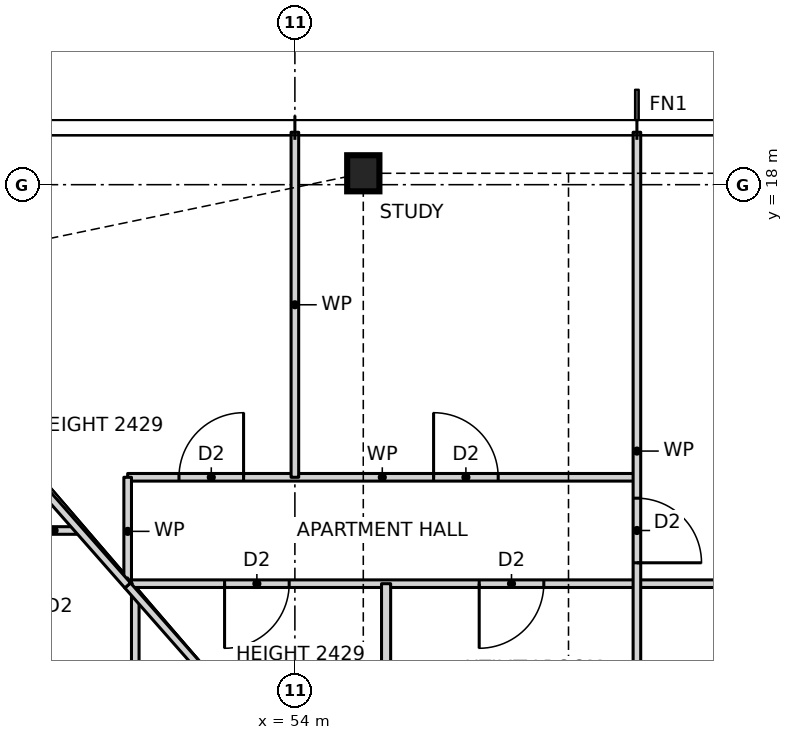
"""IFC4 building model, lengths in metres.
Left out: names, types, materials, properties, quantities, classifications, styles, units other than length and angle.
Written with IfcOpenShell. Run it as: python <this file> out.ifc"""

import sys

from ifc_helpers import new_model, si_unit, direction, frame, frame_2d, origin, origin_2d, place, context, subcontext, project, spatial, rectangle, i_section, extrude, element, fill, save


model = new_model("IFC4")
c1 = context("Model", 3, precision=1e-05, world=origin(), true_north=direction((0.0, 1.0)))
c2 = subcontext(c1, "Body", "Model", "MODEL_VIEW")
j1 = project(units=[si_unit("LENGTHUNIT", "METRE"), si_unit("PLANEANGLEUNIT", "RADIAN")], contexts=[c1])
p1 = place(None, origin())
s1 = spatial("IfcSite", under=j1, at=p1, CompositionType="ELEMENT")
p2 = place(p1, origin())
s2 = spatial("IfcBuilding", under=s1, at=p2, CompositionType="ELEMENT")
p3 = place(p2, frame((0.0, 0.0, 15.0)))
s3 = spatial("IfcBuildingStorey", under=s2, at=p3, CompositionType="ELEMENT", Elevation=15.0)
p4 = place(p3, frame((54.9, 18.15, 0.0), z_axis=(0.0, 0.0, 1.0), x_axis=(1.0, 0.0, 0.0)))
e1 = element("IfcColumn", 1, at=p4, inside=s3, PredefinedType="COLUMN", context=c2, shape_type="SweptSolid", body=[
    extrude(i_section(OverallWidth=0.424, OverallDepth=0.475, WebThickness=0.048, FlangeThickness=0.077, at=origin_2d()), origin(), (0.0, 0.0, 1.0), 3.5),
])
p5 = place(p3, frame((51.8, 12.75, 0.0), z_axis=(0.0, 0.0, 1.0), x_axis=(1.0, 0.0, 0.0)))
e2 = element("IfcWall", 2, at=p5, inside=s3, PredefinedType="PARTITIONING", context=c2, shape_type="SweptSolid", body=[
    extrude(rectangle(XDim=22.4, YDim=0.1, at=frame_2d((11.2, 0.0))), origin(), (0.0, 0.0, 1.0), 3.27),
])
p6 = place(p5, frame((13.475, 0.0, 0.0)))
e3 = element("IfcOpeningElement", 3, at=p6, cuts=e2, PredefinedType="OPENING", context=c2, shape_type="SweptSolid", body=[
    extrude(rectangle(XDim=0.85, YDim=2.1, at=frame_2d((0.425, 1.05))), frame((0.0, 0.06, 0.0), z_axis=(0.0, -1.0, 0.0), x_axis=(1.0, 0.0, 0.0)), (0.0, 0.0, 1.0), 0.12),
])
p7 = place(p5, frame((10.275, 0.0, 0.0)))
e4 = element("IfcOpeningElement", 4, at=p7, cuts=e2, PredefinedType="OPENING", context=c2, shape_type="SweptSolid", body=[
    extrude(rectangle(XDim=0.85, YDim=2.1, at=frame_2d((0.425, 1.05))), frame((0.0, 0.06, 0.0), z_axis=(0.0, -1.0, 0.0), x_axis=(1.0, 0.0, 0.0)), (0.0, 0.0, 1.0), 0.12),
])
p8 = place(p5, frame((16.925, 0.0, 0.0)))
e5 = element("IfcOpeningElement", 5, at=p8, cuts=e2, PredefinedType="OPENING", context=c2, shape_type="SweptSolid", body=[
    extrude(rectangle(XDim=0.85, YDim=2.1, at=frame_2d((0.425, 1.05))), frame((0.0, 0.06, 0.0), z_axis=(0.0, -1.0, 0.0), x_axis=(1.0, 0.0, 0.0)), (0.0, 0.0, 1.0), 0.12),
])
p9 = place(p5, frame((20.275, 0.0, 0.0)))
e6 = element("IfcOpeningElement", 6, at=p9, cuts=e2, PredefinedType="OPENING", context=c2, shape_type="SweptSolid", body=[
    extrude(rectangle(XDim=0.85, YDim=2.1, at=frame_2d((0.425, 1.05))), frame((0.0, 0.06, 0.0), z_axis=(0.0, -1.0, 0.0), x_axis=(1.0, 0.0, 0.0)), (0.0, 0.0, 1.0), 0.12),
])
p10 = place(p5, frame((4.625, 0.0, 0.0)))
e7 = element("IfcOpeningElement", 7, at=p10, cuts=e2, PredefinedType="OPENING", context=c2, shape_type="SweptSolid", body=[
    extrude(rectangle(XDim=0.85, YDim=2.1, at=frame_2d((0.425, 1.05))), frame((0.0, 0.06, 0.0), z_axis=(0.0, -1.0, 0.0), x_axis=(1.0, 0.0, 0.0)), (0.0, 0.0, 1.0), 0.12),
])
p11 = place(p5, frame((1.275, 0.0, 0.0)))
e8 = element("IfcOpeningElement", 8, at=p11, cuts=e2, PredefinedType="OPENING", context=c2, shape_type="SweptSolid", body=[
    extrude(rectangle(XDim=0.85, YDim=2.1, at=frame_2d((0.425, 1.05))), frame((0.0, 0.06, 0.0), z_axis=(0.0, -1.0, 0.0), x_axis=(1.0, 0.0, 0.0)), (0.0, 0.0, 1.0), 0.12),
])
p12 = place(p3, frame((50.5, 13.45, 0.0), z_axis=(0.0, 0.0, 1.0), x_axis=(1.0, 0.0, 0.0)))
e9 = element("IfcWall", 9, at=p12, inside=s3, PredefinedType="PARTITIONING", context=c2, shape_type="SweptSolid", body=[
    extrude(rectangle(XDim=0.664, YDim=0.1, at=frame_2d((0.332, 0.0))), origin(), (0.0, 0.0, 1.0), 3.27),
])
p13 = place(p3, frame((51.8, 14.15, 0.0), z_axis=(0.0, 0.0, 1.0), x_axis=(1.0, 0.0, 0.0)))
e10 = element("IfcWall", 10, at=p13, inside=s3, PredefinedType="PARTITIONING", context=c2, shape_type="SweptSolid", body=[
    extrude(rectangle(XDim=6.7, YDim=0.1, at=frame_2d((3.35, 0.0))), origin(), (0.0, 0.0, 1.0), 3.27),
])
p14 = place(p13, frame((4.025, 0.0, 0.0)))
e11 = element("IfcOpeningElement", 11, at=p14, cuts=e10, PredefinedType="OPENING", context=c2, shape_type="SweptSolid", body=[
    extrude(rectangle(XDim=0.85, YDim=2.1, at=frame_2d((0.425, 1.05))), frame((0.0, 0.06, 0.0), z_axis=(0.0, -1.0, 0.0), x_axis=(1.0, 0.0, 0.0)), (0.0, 0.0, 1.0), 0.12),
])
p15 = place(p13, frame((0.675, 0.0, 0.0)))
e12 = element("IfcOpeningElement", 12, at=p15, cuts=e10, PredefinedType="OPENING", context=c2, shape_type="SweptSolid", body=[
    extrude(rectangle(XDim=0.85, YDim=2.1, at=frame_2d((0.425, 1.05))), frame((0.0, 0.06, 0.0), z_axis=(0.0, -1.0, 0.0), x_axis=(1.0, 0.0, 0.0)), (0.0, 0.0, 1.0), 0.12),
])
p16 = place(p3, frame((58.5, 10.3, 0.0), z_axis=(0.0, 0.0, 1.0), x_axis=(0.0, 1.0, 0.0)))
e13 = element("IfcWall", 13, at=p16, inside=s3, PredefinedType="PARTITIONING", context=c2, shape_type="SweptSolid", body=[
    extrude(rectangle(XDim=8.39, YDim=0.1, at=frame_2d((4.195, 0.0))), origin(), (0.0, 0.0, 1.0), 3.27),
])
p17 = place(p16, frame((2.725, 0.0, 0.0)))
e14 = element("IfcOpeningElement", 14, at=p17, cuts=e13, PredefinedType="OPENING", context=c2, shape_type="SweptSolid", body=[
    extrude(rectangle(XDim=0.85, YDim=2.1, at=frame_2d((0.425, 1.05))), frame((0.0, 0.06, 0.0), z_axis=(0.0, -1.0, 0.0), x_axis=(1.0, 0.0, 0.0)), (0.0, 0.0, 1.0), 0.12),
])
p18 = place(p3, frame((55.2, 10.3, 0.0), z_axis=(0.0, 0.0, 1.0), x_axis=(0.0, 1.0, 0.0)))
e15 = element("IfcWall", 15, at=p18, inside=s3, PredefinedType="PARTITIONING", context=c2, shape_type="SweptSolid", body=[
    extrude(rectangle(XDim=2.45, YDim=0.12, at=frame_2d((1.225, 0.0))), origin(), (0.0, 0.0, 1.0), 3.27),
])
p19 = place(p3, frame((54.0, 14.15, 0.0), z_axis=(0.0, 0.0, 1.0), x_axis=(0.0, 1.0, 0.0)))
e16 = element("IfcWall", 16, at=p19, inside=s3, PredefinedType="PARTITIONING", context=c2, shape_type="SweptSolid", body=[
    extrude(rectangle(XDim=4.54, YDim=0.1, at=frame_2d((2.27, 0.0))), origin(), (0.0, 0.0, 1.0), 3.27),
])
p20 = place(p3, frame((51.9, -12.614, 0.0), z_axis=(0.0, 0.0, 1.0), x_axis=(0.0, 1.0, 0.0)))
e17 = element("IfcWall", 17, at=p20, inside=s3, PredefinedType="PARTITIONING", context=c2, shape_type="SweptSolid", body=[
    extrude(rectangle(XDim=25.228, YDim=0.1, at=frame_2d((12.614, 0.0))), origin(), (0.0, 0.0, 1.0), 3.27),
])
p21 = place(p20, frame((12.639, 0.0, 0.0)))
e18 = element("IfcOpeningElement", 18, at=p21, cuts=e17, PredefinedType="OPENING", context=c2, shape_type="SweptSolid", body=[
    extrude(rectangle(XDim=0.85, YDim=2.1, at=frame_2d((0.425, 1.05))), frame((0.0, 0.06, 0.0), z_axis=(0.0, -1.0, 0.0), x_axis=(1.0, 0.0, 0.0)), (0.0, 0.0, 1.0), 0.12),
])
p22 = place(p20, frame((9.439, 0.0, 0.0)))
e19 = element("IfcOpeningElement", 19, at=p22, cuts=e17, PredefinedType="OPENING", context=c2, shape_type="SweptSolid", body=[
    extrude(rectangle(XDim=0.85, YDim=2.1, at=frame_2d((0.425, 1.05))), frame((0.0, 0.06, 0.0), z_axis=(0.0, -1.0, 0.0), x_axis=(1.0, 0.0, 0.0)), (0.0, 0.0, 1.0), 0.12),
])
p23 = place(p20, frame((16.639, 0.0, 0.0)))
e20 = element("IfcOpeningElement", 20, at=p23, cuts=e17, PredefinedType="OPENING", context=c2, shape_type="SweptSolid", body=[
    extrude(rectangle(XDim=0.85, YDim=2.1, at=frame_2d((0.425, 1.05))), frame((0.0, 0.06, 0.0), z_axis=(0.0, -1.0, 0.0), x_axis=(1.0, 0.0, 0.0)), (0.0, 0.0, 1.0), 0.12),
])
p24 = place(p20, frame((21.821, 0.0, 0.0)))
e21 = element("IfcOpeningElement", 21, at=p24, cuts=e17, PredefinedType="OPENING", context=c2, shape_type="SweptSolid", body=[
    extrude(rectangle(XDim=0.85, YDim=2.1, at=frame_2d((0.425, 1.05))), frame((0.0, 0.06, 0.0), z_axis=(0.0, -1.0, 0.0), x_axis=(1.0, 0.0, 0.0)), (0.0, 0.0, 1.0), 0.12),
])
p25 = place(p20, frame((2.507, 0.0, 0.0)))
e22 = element("IfcOpeningElement", 22, at=p25, cuts=e17, PredefinedType="OPENING", context=c2, shape_type="SweptSolid", body=[
    extrude(rectangle(XDim=0.85, YDim=2.1, at=frame_2d((0.425, 1.05))), frame((0.0, 0.06, 0.0), z_axis=(0.0, -1.0, 0.0), x_axis=(1.0, 0.0, 0.0)), (0.0, 0.0, 1.0), 0.12),
])
p26 = place(p3, frame((51.8, 12.727, 0.0), z_axis=(0.0, 0.0, 1.0), x_axis=(0.0, 1.0, 0.0)))
e23 = element("IfcWall", 23, at=p26, inside=s3, PredefinedType="PARTITIONING", context=c2, shape_type="SweptSolid", body=[
    extrude(rectangle(XDim=1.423, YDim=0.1, at=frame_2d((0.711, 0.0))), origin(), (0.0, 0.0, 1.0), 3.27),
])
p27 = place(p3, frame((53.936, 10.3, 0.0), z_axis=(0.0, 0.0, 1.0), x_axis=(-0.660667046586, 0.75067906162, 0.0)))
e24 = element("IfcWall", 24, at=p27, inside=s3, PredefinedType="PARTITIONING", context=c2, shape_type="SweptSolid", body=[
    extrude(rectangle(XDim=3.233, YDim=0.1, at=frame_2d((1.617, 0.0))), origin(), (0.0, 0.0, 1.0), 2.429),
])
p28 = place(p3, frame((51.8, 12.727, 0.0), z_axis=(0.0, 0.0, 1.0), x_axis=(-0.660690123093, 0.750658751529, 0.0)))
e25 = element("IfcWall", 25, at=p28, inside=s3, PredefinedType="PARTITIONING", context=c2, shape_type="SweptSolid", body=[
    extrude(rectangle(XDim=5.837, YDim=0.1, at=frame_2d((2.918, 0.0))), origin(), (0.0, 0.0, 1.0), 2.429),
])
p29 = place(p17, frame((0.85, 0.0, 0.0), z_axis=(0.0, 0.0, 1.0), x_axis=(-1.0, 0.0, 0.0)))
e26 = element("IfcDoor", 26, at=p29, inside=s3, OperationType="SINGLE_SWING_RIGHT", PredefinedType="DOOR", context=c2, shape_type="SweptSolid", body=[
    extrude(rectangle(XDim=0.85, YDim=2.1, at=frame_2d((0.425, 1.05))), frame((0.0, 0.025, 0.0), z_axis=(0.0, -1.0, 0.0), x_axis=(1.0, 0.0, 0.0)), (0.0, 0.0, 1.0), 0.05),
])
fill(e14, e26)
p30 = place(p14, origin())
e27 = element("IfcDoor", 27, at=p30, inside=s3, OperationType="SINGLE_SWING_LEFT", PredefinedType="DOOR", context=c2, shape_type="SweptSolid", body=[
    extrude(rectangle(XDim=0.85, YDim=2.1, at=frame_2d((0.425, 1.05))), frame((0.0, 0.025, 0.0), z_axis=(0.0, -1.0, 0.0), x_axis=(1.0, 0.0, 0.0)), (0.0, 0.0, 1.0), 0.05),
])
fill(e11, e27)
p31 = place(p15, origin())
e28 = element("IfcDoor", 28, at=p31, inside=s3, OperationType="SINGLE_SWING_RIGHT", PredefinedType="DOOR", context=c2, shape_type="SweptSolid", body=[
    extrude(rectangle(XDim=0.85, YDim=2.1, at=frame_2d((0.425, 1.05))), frame((0.0, 0.025, 0.0), z_axis=(0.0, -1.0, 0.0), x_axis=(1.0, 0.0, 0.0)), (0.0, 0.0, 1.0), 0.05),
])
fill(e12, e28)
p32 = place(p10, frame((0.85, 0.0, 0.0), z_axis=(0.0, 0.0, 1.0), x_axis=(-1.0, 0.0, 0.0)))
e29 = element("IfcDoor", 29, at=p32, inside=s3, OperationType="SINGLE_SWING_RIGHT", PredefinedType="DOOR", context=c2, shape_type="SweptSolid", body=[
    extrude(rectangle(XDim=0.85, YDim=2.1, at=frame_2d((0.425, 1.05))), frame((0.0, 0.025, 0.0), z_axis=(0.0, -1.0, 0.0), x_axis=(1.0, 0.0, 0.0)), (0.0, 0.0, 1.0), 0.05),
])
fill(e7, e29)
p33 = place(p11, frame((0.85, 0.0, 0.0), z_axis=(0.0, 0.0, 1.0), x_axis=(-1.0, 0.0, 0.0)))
e30 = element("IfcDoor", 30, at=p33, inside=s3, OperationType="SINGLE_SWING_RIGHT", PredefinedType="DOOR", context=c2, shape_type="SweptSolid", body=[
    extrude(rectangle(XDim=0.85, YDim=2.1, at=frame_2d((0.425, 1.05))), frame((0.0, 0.025, 0.0), z_axis=(0.0, -1.0, 0.0), x_axis=(1.0, 0.0, 0.0)), (0.0, 0.0, 1.0), 0.05),
])
fill(e8, e30)
save(model, sys.argv[1])
